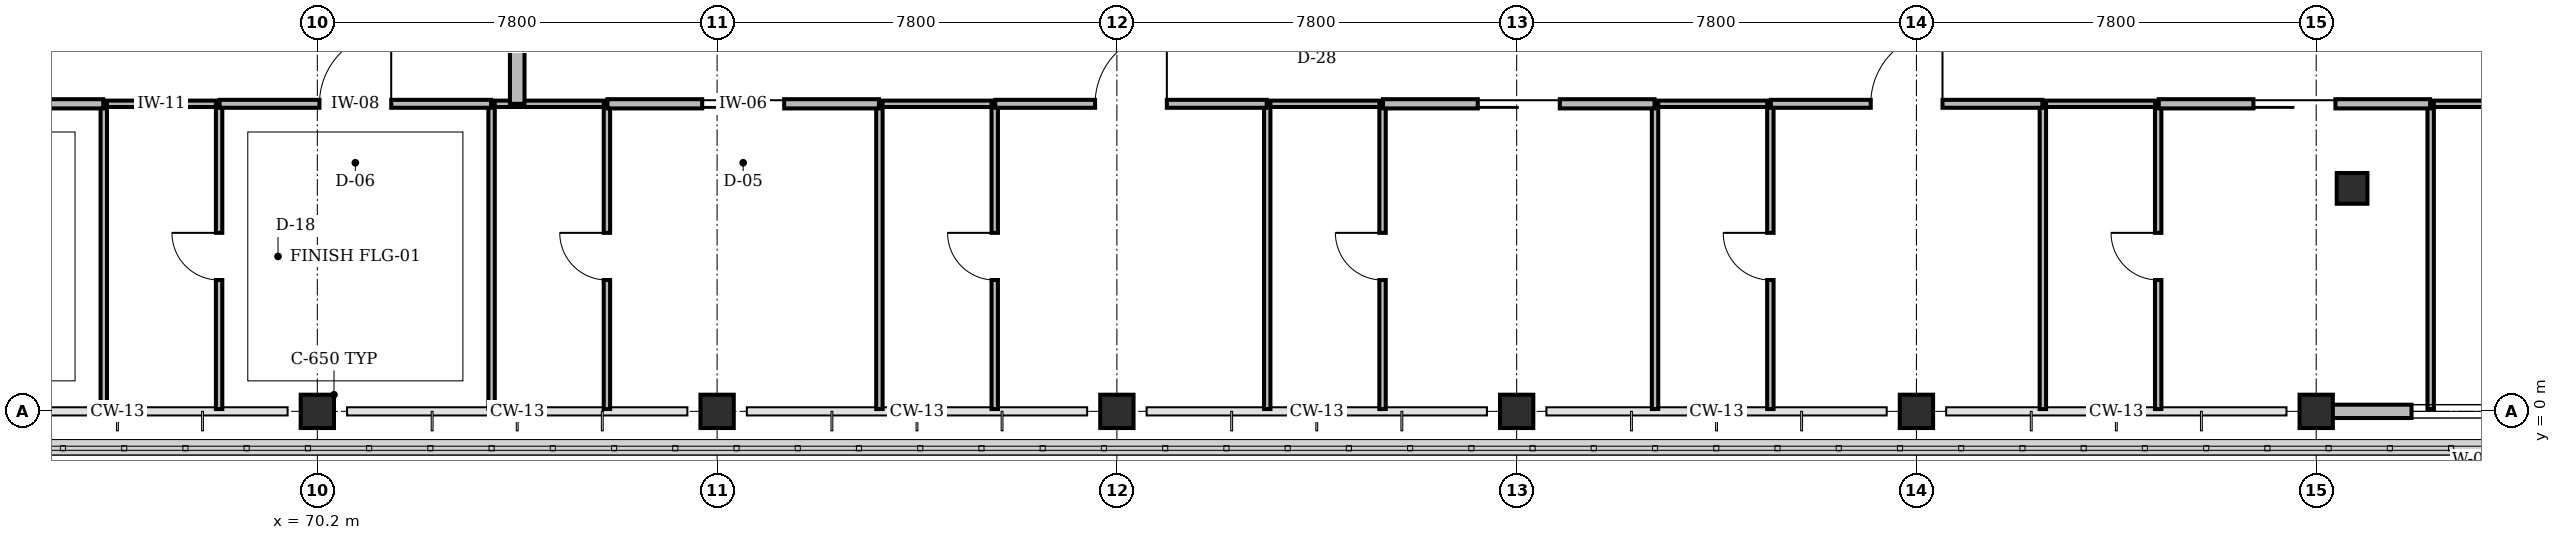
"""IFC4 building model, lengths in metres.
Left out: names, types, materials, properties, quantities, classifications, styles, units other than length and angle.
Written with IfcOpenShell. Run it as: python <this file> out.ifc"""

import sys

from ifc_helpers import new_model, si_unit, direction, frame, frame_2d, origin, origin_2d, place, context, subcontext, project, spatial, rectangle, circle, extrude, element, fill, save


model = new_model("IFC4")
c1 = context("Model", 3, precision=1e-05, world=origin(), true_north=direction((0.0, 1.0)))
c2 = subcontext(c1, "Body", "Model", "MODEL_VIEW")
j1 = project(units=[si_unit("LENGTHUNIT", "METRE"), si_unit("PLANEANGLEUNIT", "RADIAN")], contexts=[c1])
p1 = place(None, origin())
s1 = spatial("IfcSite", under=j1, at=p1, CompositionType="ELEMENT")
p2 = place(p1, origin())
s2 = spatial("IfcBuilding", under=s1, at=p2, CompositionType="ELEMENT")
p3 = place(p2, frame((0.0, 0.0, 18.0)))
s3 = spatial("IfcBuildingStorey", under=s2, at=p3, CompositionType="ELEMENT", Elevation=18.0)
for number, where, z_axis, x_axis in (
    (1, (70.2, 0.0, 0.0), (0.0, 0.0, 1.0), (1.0, 0.0, 0.0)),
    (2, (78.0, 0.0, 0.0), (0.0, 0.0, 1.0), (1.0, 0.0, 0.0)),
    (3, (85.8, 0.0, 0.0), (0.0, 0.0, 1.0), (1.0, 0.0, 0.0)),
    (4, (93.6, 0.0, 0.0), (0.0, 0.0, 1.0), (1.0, 0.0, 0.0)),
    (5, (101.4, 0.0, 0.0), (0.0, 0.0, 1.0), (1.0, 0.0, 0.0)),
    (6, (109.2, 0.0, 0.0), (0.0, 0.0, 1.0), (1.0, 0.0, 0.0)),
):
    element("IfcColumn", number, at=place(p3, frame(where, z_axis=z_axis, x_axis=x_axis)), inside=s3, PredefinedType="COLUMN", context=c2, shape_type="SweptSolid", body=[
        extrude(rectangle(XDim=0.65, YDim=0.65, at=origin_2d()), origin(), (0.0, 0.0, 1.0), 4.2),
    ])
p4 = place(p3, frame((109.9, 4.35, 0.0), z_axis=(0.0, 0.0, 1.0), x_axis=(1.0, 0.0, 0.0)))
e7 = element("IfcColumn", 7, at=p4, inside=s3, PredefinedType="PILASTER", context=c2, shape_type="SweptSolid", body=[
    extrude(circle(Radius=0.3, at=origin_2d()), origin(), (0.0, 0.0, 1.0), 4.2),
])
p5 = place(p3, frame((119.0, 0.0, 0.0), z_axis=(0.0, 0.0, 1.0), x_axis=(-1.0, 0.0, 0.0)))
e8 = element("IfcWall", 8, at=p5, inside=s3, PredefinedType="STANDARD", context=c2, shape_type="SweptSolid", body=[
    extrude(rectangle(XDim=9.51, YDim=0.26, at=frame_2d((4.755, 0.0))), origin(), (0.0, 0.0, 1.0), 2.805),
])
p6 = place(p5, frame((5.54, 0.0, 0.85)))
e9 = element("IfcOpeningElement", 9, at=p6, cuts=e8, PredefinedType="OPENING", context=c2, shape_type="SweptSolid", body=[
    extrude(rectangle(XDim=2.4, YDim=1.5, at=frame_2d((1.2, 0.75))), frame((0.0, 0.14, 0.0), z_axis=(0.0, -1.0, 0.0), x_axis=(1.0, 0.0, 0.0)), (0.0, 0.0, 1.0), 0.28),
])
p7 = place(p3, frame((66.033, 6.0, 0.0), z_axis=(0.0, 0.0, 1.0), x_axis=(1.0, 0.0, 0.0)))
e10 = element("IfcWall", 10, at=p7, inside=s3, PredefinedType="PARTITIONING", context=c2, shape_type="SweptSolid", body=[
    extrude(rectangle(XDim=2.25, YDim=0.125, at=frame_2d((1.125, 0.0))), origin(), (0.0, 0.0, 1.0), 3.9),
])
p8 = place(p3, frame((66.033, 0.045, 0.0), z_axis=(0.0, 0.0, 1.0), x_axis=(0.0, 1.0, 0.0)))
e11 = element("IfcWall", 11, at=p8, inside=s3, PredefinedType="PARTITIONING", context=c2, shape_type="SweptSolid", body=[
    extrude(rectangle(XDim=5.955, YDim=0.125, at=frame_2d((2.978, 0.0))), origin(), (0.0, 0.0, 1.0), 3.9),
])
p9 = place(p3, frame((68.283, 0.045, 0.0), z_axis=(0.0, 0.0, 1.0), x_axis=(0.0, 1.0, 0.0)))
e12 = element("IfcWall", 12, at=p9, inside=s3, PredefinedType="PARTITIONING", context=c2, shape_type="SweptSolid", body=[
    extrude(rectangle(XDim=5.955, YDim=0.125, at=frame_2d((2.978, 0.0))), origin(), (0.0, 0.0, 1.0), 3.9),
])
p10 = place(p9, frame((2.518, 0.0, 0.0)))
e13 = element("IfcOpeningElement", 13, at=p10, cuts=e12, PredefinedType="OPENING", context=c2, shape_type="SweptSolid", body=[
    extrude(rectangle(XDim=0.92, YDim=2.1, at=frame_2d((0.46, 1.05))), frame((0.0, 0.073, 0.0), z_axis=(0.0, -1.0, 0.0), x_axis=(1.0, 0.0, 0.0)), (0.0, 0.0, 1.0), 0.145),
])
p11 = place(p3, frame((73.6, 6.0, 0.0), z_axis=(0.0, 0.0, 1.0), x_axis=(1.0, 0.0, 0.0)))
e14 = element("IfcWall", 14, at=p11, inside=s3, PredefinedType="PARTITIONING", context=c2, shape_type="SweptSolid", body=[
    extrude(rectangle(XDim=2.25, YDim=0.125, at=frame_2d((1.125, 0.0))), origin(), (0.0, 0.0, 1.0), 3.9),
])
p12 = place(p3, frame((73.6, 0.045, 0.0), z_axis=(0.0, 0.0, 1.0), x_axis=(0.0, 1.0, 0.0)))
e15 = element("IfcWall", 15, at=p12, inside=s3, PredefinedType="PARTITIONING", context=c2, shape_type="SweptSolid", body=[
    extrude(rectangle(XDim=5.955, YDim=0.125, at=frame_2d((2.978, 0.0))), origin(), (0.0, 0.0, 1.0), 3.9),
])
p13 = place(p3, frame((75.85, 0.045, 0.0), z_axis=(0.0, 0.0, 1.0), x_axis=(0.0, 1.0, 0.0)))
e16 = element("IfcWall", 16, at=p13, inside=s3, PredefinedType="PARTITIONING", context=c2, shape_type="SweptSolid", body=[
    extrude(rectangle(XDim=5.955, YDim=0.125, at=frame_2d((2.978, 0.0))), origin(), (0.0, 0.0, 1.0), 3.9),
])
p14 = place(p13, frame((2.518, 0.0, 0.0)))
e17 = element("IfcOpeningElement", 17, at=p14, cuts=e16, PredefinedType="OPENING", context=c2, shape_type="SweptSolid", body=[
    extrude(rectangle(XDim=0.92, YDim=2.1, at=frame_2d((0.46, 1.05))), frame((0.0, 0.073, 0.0), z_axis=(0.0, -1.0, 0.0), x_axis=(1.0, 0.0, 0.0)), (0.0, 0.0, 1.0), 0.145),
])
p15 = place(p3, frame((81.167, 6.0, 0.0), z_axis=(0.0, 0.0, 1.0), x_axis=(1.0, 0.0, 0.0)))
e18 = element("IfcWall", 18, at=p15, inside=s3, PredefinedType="PARTITIONING", context=c2, shape_type="SweptSolid", body=[
    extrude(rectangle(XDim=2.25, YDim=0.125, at=frame_2d((1.125, 0.0))), origin(), (0.0, 0.0, 1.0), 3.9),
])
p16 = place(p3, frame((81.167, 0.045, 0.0), z_axis=(0.0, 0.0, 1.0), x_axis=(0.0, 1.0, 0.0)))
e19 = element("IfcWall", 19, at=p16, inside=s3, PredefinedType="PARTITIONING", context=c2, shape_type="SweptSolid", body=[
    extrude(rectangle(XDim=5.955, YDim=0.125, at=frame_2d((2.978, 0.0))), origin(), (0.0, 0.0, 1.0), 3.9),
])
p17 = place(p3, frame((83.417, 0.045, 0.0), z_axis=(0.0, 0.0, 1.0), x_axis=(0.0, 1.0, 0.0)))
e20 = element("IfcWall", 20, at=p17, inside=s3, PredefinedType="PARTITIONING", context=c2, shape_type="SweptSolid", body=[
    extrude(rectangle(XDim=5.955, YDim=0.125, at=frame_2d((2.978, 0.0))), origin(), (0.0, 0.0, 1.0), 3.9),
])
p18 = place(p17, frame((2.518, 0.0, 0.0)))
e21 = element("IfcOpeningElement", 21, at=p18, cuts=e20, PredefinedType="OPENING", context=c2, shape_type="SweptSolid", body=[
    extrude(rectangle(XDim=0.92, YDim=2.1, at=frame_2d((0.46, 1.05))), frame((0.0, 0.073, 0.0), z_axis=(0.0, -1.0, 0.0), x_axis=(1.0, 0.0, 0.0)), (0.0, 0.0, 1.0), 0.145),
])
p19 = place(p3, frame((88.733, 6.0, 0.0), z_axis=(0.0, 0.0, 1.0), x_axis=(1.0, 0.0, 0.0)))
e22 = element("IfcWall", 22, at=p19, inside=s3, PredefinedType="PARTITIONING", context=c2, shape_type="SweptSolid", body=[
    extrude(rectangle(XDim=2.25, YDim=0.125, at=frame_2d((1.125, 0.0))), origin(), (0.0, 0.0, 1.0), 3.9),
])
p20 = place(p3, frame((88.733, 0.045, 0.0), z_axis=(0.0, 0.0, 1.0), x_axis=(0.0, 1.0, 0.0)))
e23 = element("IfcWall", 23, at=p20, inside=s3, PredefinedType="PARTITIONING", context=c2, shape_type="SweptSolid", body=[
    extrude(rectangle(XDim=5.955, YDim=0.125, at=frame_2d((2.978, 0.0))), origin(), (0.0, 0.0, 1.0), 3.9),
])
p21 = place(p3, frame((90.983, 0.045, 0.0), z_axis=(0.0, 0.0, 1.0), x_axis=(0.0, 1.0, 0.0)))
e24 = element("IfcWall", 24, at=p21, inside=s3, PredefinedType="PARTITIONING", context=c2, shape_type="SweptSolid", body=[
    extrude(rectangle(XDim=5.955, YDim=0.125, at=frame_2d((2.978, 0.0))), origin(), (0.0, 0.0, 1.0), 3.9),
])
p22 = place(p21, frame((2.518, 0.0, 0.0)))
e25 = element("IfcOpeningElement", 25, at=p22, cuts=e24, PredefinedType="OPENING", context=c2, shape_type="SweptSolid", body=[
    extrude(rectangle(XDim=0.92, YDim=2.1, at=frame_2d((0.46, 1.05))), frame((0.0, 0.073, 0.0), z_axis=(0.0, -1.0, 0.0), x_axis=(1.0, 0.0, 0.0)), (0.0, 0.0, 1.0), 0.145),
])
p23 = place(p3, frame((96.3, 6.0, 0.0), z_axis=(0.0, 0.0, 1.0), x_axis=(1.0, 0.0, 0.0)))
e26 = element("IfcWall", 26, at=p23, inside=s3, PredefinedType="PARTITIONING", context=c2, shape_type="SweptSolid", body=[
    extrude(rectangle(XDim=2.25, YDim=0.125, at=frame_2d((1.125, 0.0))), origin(), (0.0, 0.0, 1.0), 3.9),
])
p24 = place(p3, frame((96.3, 0.045, 0.0), z_axis=(0.0, 0.0, 1.0), x_axis=(0.0, 1.0, 0.0)))
e27 = element("IfcWall", 27, at=p24, inside=s3, PredefinedType="PARTITIONING", context=c2, shape_type="SweptSolid", body=[
    extrude(rectangle(XDim=5.955, YDim=0.125, at=frame_2d((2.978, 0.0))), origin(), (0.0, 0.0, 1.0), 3.9),
])
p25 = place(p3, frame((98.55, 0.045, 0.0), z_axis=(0.0, 0.0, 1.0), x_axis=(0.0, 1.0, 0.0)))
e28 = element("IfcWall", 28, at=p25, inside=s3, PredefinedType="PARTITIONING", context=c2, shape_type="SweptSolid", body=[
    extrude(rectangle(XDim=5.955, YDim=0.125, at=frame_2d((2.978, 0.0))), origin(), (0.0, 0.0, 1.0), 3.9),
])
p26 = place(p25, frame((2.518, 0.0, 0.0)))
e29 = element("IfcOpeningElement", 29, at=p26, cuts=e28, PredefinedType="OPENING", context=c2, shape_type="SweptSolid", body=[
    extrude(rectangle(XDim=0.92, YDim=2.1, at=frame_2d((0.46, 1.05))), frame((0.0, 0.073, 0.0), z_axis=(0.0, -1.0, 0.0), x_axis=(1.0, 0.0, 0.0)), (0.0, 0.0, 1.0), 0.145),
])
p27 = place(p3, frame((103.867, 6.0, 0.0), z_axis=(0.0, 0.0, 1.0), x_axis=(1.0, 0.0, 0.0)))
e30 = element("IfcWall", 30, at=p27, inside=s3, PredefinedType="PARTITIONING", context=c2, shape_type="SweptSolid", body=[
    extrude(rectangle(XDim=2.25, YDim=0.125, at=frame_2d((1.125, 0.0))), origin(), (0.0, 0.0, 1.0), 3.9),
])
p28 = place(p3, frame((103.867, 0.045, 0.0), z_axis=(0.0, 0.0, 1.0), x_axis=(0.0, 1.0, 0.0)))
e31 = element("IfcWall", 31, at=p28, inside=s3, PredefinedType="PARTITIONING", context=c2, shape_type="SweptSolid", body=[
    extrude(rectangle(XDim=5.955, YDim=0.125, at=frame_2d((2.978, 0.0))), origin(), (0.0, 0.0, 1.0), 3.9),
])
p29 = place(p3, frame((106.117, 0.045, 0.0), z_axis=(0.0, 0.0, 1.0), x_axis=(0.0, 1.0, 0.0)))
e32 = element("IfcWall", 32, at=p29, inside=s3, PredefinedType="PARTITIONING", context=c2, shape_type="SweptSolid", body=[
    extrude(rectangle(XDim=5.955, YDim=0.125, at=frame_2d((2.978, 0.0))), origin(), (0.0, 0.0, 1.0), 3.9),
])
p30 = place(p29, frame((2.518, 0.0, 0.0)))
e33 = element("IfcOpeningElement", 33, at=p30, cuts=e32, PredefinedType="OPENING", context=c2, shape_type="SweptSolid", body=[
    extrude(rectangle(XDim=0.92, YDim=2.1, at=frame_2d((0.46, 1.05))), frame((0.0, 0.073, 0.0), z_axis=(0.0, -1.0, 0.0), x_axis=(1.0, 0.0, 0.0)), (0.0, 0.0, 1.0), 0.145),
])
p31 = place(p3, frame((111.433, 6.0, 0.0), z_axis=(0.0, 0.0, 1.0), x_axis=(1.0, 0.0, 0.0)))
e34 = element("IfcWall", 34, at=p31, inside=s3, PredefinedType="PARTITIONING", context=c2, shape_type="SweptSolid", body=[
    extrude(rectangle(XDim=2.25, YDim=0.125, at=frame_2d((1.125, 0.0))), origin(), (0.0, 0.0, 1.0), 3.9),
])
p32 = place(p3, frame((111.433, 0.045, 0.0), z_axis=(0.0, 0.0, 1.0), x_axis=(0.0, 1.0, 0.0)))
e35 = element("IfcWall", 35, at=p32, inside=s3, PredefinedType="PARTITIONING", context=c2, shape_type="SweptSolid", body=[
    extrude(rectangle(XDim=5.955, YDim=0.125, at=frame_2d((2.978, 0.0))), origin(), (0.0, 0.0, 1.0), 3.9),
])
p33 = place(p3, frame((60.727, 6.0, 0.0), z_axis=(0.0, 0.0, 1.0), x_axis=(1.0, 0.0, 0.0)))
e36 = element("IfcWall", 36, at=p33, inside=s3, PredefinedType="PARTITIONING", context=c2, shape_type="SweptSolid", body=[
    extrude(rectangle(XDim=5.296, YDim=0.18, at=frame_2d((2.648, 0.0))), origin(), (0.0, 0.0, 1.0), 3.9),
])
p34 = place(p33, frame((1.848, 0.0, 0.0)))
e37 = element("IfcOpeningElement", 37, at=p34, cuts=e36, PredefinedType="OPENING", context=c2, shape_type="SweptSolid", body=[
    extrude(rectangle(XDim=1.6, YDim=2.25, at=frame_2d((0.8, 1.125))), frame((0.0, 0.1, 0.0), z_axis=(0.0, -1.0, 0.0), x_axis=(1.0, 0.0, 0.0)), (0.0, 0.0, 1.0), 0.2),
])
p35 = place(p3, frame((68.293, 6.0, 0.0), z_axis=(0.0, 0.0, 1.0), x_axis=(1.0, 0.0, 0.0)))
e38 = element("IfcWall", 38, at=p35, inside=s3, PredefinedType="PARTITIONING", context=c2, shape_type="SweptSolid", body=[
    extrude(rectangle(XDim=5.297, YDim=0.155, at=frame_2d((2.648, 0.0))), origin(), (0.0, 0.0, 1.0), 3.9),
])
p36 = place(p35, frame((1.948, 0.0, 0.0)))
e39 = element("IfcOpeningElement", 39, at=p36, cuts=e38, PredefinedType="OPENING", context=c2, shape_type="SweptSolid", body=[
    extrude(rectangle(XDim=1.4, YDim=2.2, at=frame_2d((0.7, 1.1))), frame((0.0, 0.087, 0.0), z_axis=(0.0, -1.0, 0.0), x_axis=(1.0, 0.0, 0.0)), (0.0, 0.0, 1.0), 0.175),
])
p37 = place(p3, frame((75.86, 6.0, 0.0), z_axis=(0.0, 0.0, 1.0), x_axis=(1.0, 0.0, 0.0)))
e40 = element("IfcWall", 40, at=p37, inside=s3, PredefinedType="PARTITIONING", context=c2, shape_type="SweptSolid", body=[
    extrude(rectangle(XDim=5.297, YDim=0.18, at=frame_2d((2.648, 0.0))), origin(), (0.0, 0.0, 1.0), 3.9),
])
p38 = place(p37, frame((1.848, 0.0, 0.0)))
e41 = element("IfcOpeningElement", 41, at=p38, cuts=e40, PredefinedType="OPENING", context=c2, shape_type="SweptSolid", body=[
    extrude(rectangle(XDim=1.6, YDim=2.25, at=frame_2d((0.8, 1.125))), frame((0.0, 0.1, 0.0), z_axis=(0.0, -1.0, 0.0), x_axis=(1.0, 0.0, 0.0)), (0.0, 0.0, 1.0), 0.2),
])
p39 = place(p3, frame((83.427, 6.0, 0.0), z_axis=(0.0, 0.0, 1.0), x_axis=(1.0, 0.0, 0.0)))
e42 = element("IfcWall", 42, at=p39, inside=s3, PredefinedType="PARTITIONING", context=c2, shape_type="SweptSolid", body=[
    extrude(rectangle(XDim=5.296, YDim=0.155, at=frame_2d((2.648, 0.0))), origin(), (0.0, 0.0, 1.0), 3.9),
])
p40 = place(p39, frame((1.948, 0.0, 0.0)))
e43 = element("IfcOpeningElement", 43, at=p40, cuts=e42, PredefinedType="OPENING", context=c2, shape_type="SweptSolid", body=[
    extrude(rectangle(XDim=1.4, YDim=2.2, at=frame_2d((0.7, 1.1))), frame((0.0, 0.087, 0.0), z_axis=(0.0, -1.0, 0.0), x_axis=(1.0, 0.0, 0.0)), (0.0, 0.0, 1.0), 0.175),
])
p41 = place(p3, frame((90.993, 6.0, 0.0), z_axis=(0.0, 0.0, 1.0), x_axis=(1.0, 0.0, 0.0)))
e44 = element("IfcWall", 44, at=p41, inside=s3, PredefinedType="PARTITIONING", context=c2, shape_type="SweptSolid", body=[
    extrude(rectangle(XDim=5.297, YDim=0.18, at=frame_2d((2.648, 0.0))), origin(), (0.0, 0.0, 1.0), 3.9),
])
p42 = place(p41, frame((1.848, 0.0, 0.0)))
e45 = element("IfcOpeningElement", 45, at=p42, cuts=e44, PredefinedType="OPENING", context=c2, shape_type="SweptSolid", body=[
    extrude(rectangle(XDim=1.6, YDim=2.25, at=frame_2d((0.8, 1.125))), frame((0.0, 0.1, 0.0), z_axis=(0.0, -1.0, 0.0), x_axis=(1.0, 0.0, 0.0)), (0.0, 0.0, 1.0), 0.2),
])
p43 = place(p3, frame((98.56, 6.0, 0.0), z_axis=(0.0, 0.0, 1.0), x_axis=(1.0, 0.0, 0.0)))
e46 = element("IfcWall", 46, at=p43, inside=s3, PredefinedType="PARTITIONING", context=c2, shape_type="SweptSolid", body=[
    extrude(rectangle(XDim=5.297, YDim=0.155, at=frame_2d((2.648, 0.0))), origin(), (0.0, 0.0, 1.0), 3.9),
])
p44 = place(p43, frame((1.948, 0.0, 0.0)))
e47 = element("IfcOpeningElement", 47, at=p44, cuts=e46, PredefinedType="OPENING", context=c2, shape_type="SweptSolid", body=[
    extrude(rectangle(XDim=1.4, YDim=2.2, at=frame_2d((0.7, 1.1))), frame((0.0, 0.087, 0.0), z_axis=(0.0, -1.0, 0.0), x_axis=(1.0, 0.0, 0.0)), (0.0, 0.0, 1.0), 0.175),
])
p45 = place(p3, frame((106.127, 6.0, 0.0), z_axis=(0.0, 0.0, 1.0), x_axis=(1.0, 0.0, 0.0)))
e48 = element("IfcWall", 48, at=p45, inside=s3, PredefinedType="PARTITIONING", context=c2, shape_type="SweptSolid", body=[
    extrude(rectangle(XDim=5.296, YDim=0.18, at=frame_2d((2.648, 0.0))), origin(), (0.0, 0.0, 1.0), 3.9),
])
p46 = place(p45, frame((1.848, 0.0, 0.0)))
e49 = element("IfcOpeningElement", 49, at=p46, cuts=e48, PredefinedType="OPENING", context=c2, shape_type="SweptSolid", body=[
    extrude(rectangle(XDim=1.6, YDim=2.25, at=frame_2d((0.8, 1.125))), frame((0.0, 0.1, 0.0), z_axis=(0.0, -1.0, 0.0), x_axis=(1.0, 0.0, 0.0)), (0.0, 0.0, 1.0), 0.2),
])
p47 = place(p3, frame((74.1, 6.0, 0.0), z_axis=(0.0, 0.0, 1.0), x_axis=(0.0, 1.0, 0.0)))
e50 = element("IfcWall", 50, at=p47, inside=s3, PredefinedType="STANDARD", context=c2, shape_type="SweptSolid", body=[
    extrude(rectangle(XDim=2.4, YDim=0.285, at=frame_2d((1.2, 0.0))), origin(), (0.0, 0.0, 1.0), 3.9),
])
p48 = place(p6, origin())
e51 = element("IfcWindow", 51, at=p48, inside=s3, PartitioningType="SINGLE_PANEL", PredefinedType="WINDOW", context=c2, shape_type="SweptSolid", body=[
    extrude(rectangle(XDim=2.4, YDim=1.5, at=frame_2d((1.2, 0.75))), frame((0.0, 0.03, 0.0), z_axis=(0.0, -1.0, 0.0), x_axis=(1.0, 0.0, 0.0)), (0.0, 0.0, 1.0), 0.06),
])
fill(e9, e51)
p49 = place(p10, origin())
e52 = element("IfcDoor", 52, at=p49, inside=s3, OperationType="SINGLE_SWING_RIGHT", PredefinedType="DOOR", context=c2, shape_type="SweptSolid", body=[
    extrude(rectangle(XDim=0.92, YDim=2.1, at=frame_2d((0.46, 1.05))), frame((0.0, 0.025, 0.0), z_axis=(0.0, -1.0, 0.0), x_axis=(1.0, 0.0, 0.0)), (0.0, 0.0, 1.0), 0.05),
])
fill(e13, e52)
p50 = place(p14, origin())
e53 = element("IfcDoor", 53, at=p50, inside=s3, OperationType="SINGLE_SWING_RIGHT", PredefinedType="DOOR", context=c2, shape_type="SweptSolid", body=[
    extrude(rectangle(XDim=0.92, YDim=2.1, at=frame_2d((0.46, 1.05))), frame((0.0, 0.025, 0.0), z_axis=(0.0, -1.0, 0.0), x_axis=(1.0, 0.0, 0.0)), (0.0, 0.0, 1.0), 0.05),
])
fill(e17, e53)
p51 = place(p18, origin())
e54 = element("IfcDoor", 54, at=p51, inside=s3, OperationType="SINGLE_SWING_RIGHT", PredefinedType="DOOR", context=c2, shape_type="SweptSolid", body=[
    extrude(rectangle(XDim=0.92, YDim=2.1, at=frame_2d((0.46, 1.05))), frame((0.0, 0.025, 0.0), z_axis=(0.0, -1.0, 0.0), x_axis=(1.0, 0.0, 0.0)), (0.0, 0.0, 1.0), 0.05),
])
fill(e21, e54)
p52 = place(p22, origin())
e55 = element("IfcDoor", 55, at=p52, inside=s3, OperationType="SINGLE_SWING_RIGHT", PredefinedType="DOOR", context=c2, shape_type="SweptSolid", body=[
    extrude(rectangle(XDim=0.92, YDim=2.1, at=frame_2d((0.46, 1.05))), frame((0.0, 0.025, 0.0), z_axis=(0.0, -1.0, 0.0), x_axis=(1.0, 0.0, 0.0)), (0.0, 0.0, 1.0), 0.05),
])
fill(e25, e55)
p53 = place(p26, origin())
e56 = element("IfcDoor", 56, at=p53, inside=s3, OperationType="SINGLE_SWING_RIGHT", PredefinedType="DOOR", context=c2, shape_type="SweptSolid", body=[
    extrude(rectangle(XDim=0.92, YDim=2.1, at=frame_2d((0.46, 1.05))), frame((0.0, 0.025, 0.0), z_axis=(0.0, -1.0, 0.0), x_axis=(1.0, 0.0, 0.0)), (0.0, 0.0, 1.0), 0.05),
])
fill(e29, e56)
p54 = place(p30, origin())
e57 = element("IfcDoor", 57, at=p54, inside=s3, OperationType="SINGLE_SWING_RIGHT", PredefinedType="DOOR", context=c2, shape_type="SweptSolid", body=[
    extrude(rectangle(XDim=0.92, YDim=2.1, at=frame_2d((0.46, 1.05))), frame((0.0, 0.025, 0.0), z_axis=(0.0, -1.0, 0.0), x_axis=(1.0, 0.0, 0.0)), (0.0, 0.0, 1.0), 0.05),
])
fill(e33, e57)
p55 = place(p36, origin())
e58 = element("IfcDoor", 58, at=p55, inside=s3, OperationType="SINGLE_SWING_RIGHT", PredefinedType="DOOR", context=c2, shape_type="SweptSolid", body=[
    extrude(rectangle(XDim=1.4, YDim=2.2, at=frame_2d((0.7, 1.1))), frame((0.0, 0.025, 0.0), z_axis=(0.0, -1.0, 0.0), x_axis=(1.0, 0.0, 0.0)), (0.0, 0.0, 1.0), 0.05),
])
fill(e39, e58)
p56 = place(p38, origin())
e59 = element("IfcDoor", 59, at=p56, inside=s3, OperationType="SLIDING_TO_RIGHT", PredefinedType="DOOR", context=c2, shape_type="SweptSolid", body=[
    extrude(rectangle(XDim=1.6, YDim=2.25, at=frame_2d((0.8, 1.125))), frame((0.0, 0.025, 0.0), z_axis=(0.0, -1.0, 0.0), x_axis=(1.0, 0.0, 0.0)), (0.0, 0.0, 1.0), 0.05),
])
fill(e41, e59)
p57 = place(p40, origin())
e60 = element("IfcDoor", 60, at=p57, inside=s3, OperationType="SINGLE_SWING_RIGHT", PredefinedType="DOOR", context=c2, shape_type="SweptSolid", body=[
    extrude(rectangle(XDim=1.4, YDim=2.2, at=frame_2d((0.7, 1.1))), frame((0.0, 0.025, 0.0), z_axis=(0.0, -1.0, 0.0), x_axis=(1.0, 0.0, 0.0)), (0.0, 0.0, 1.0), 0.05),
])
fill(e43, e60)
p58 = place(p42, origin())
e61 = element("IfcDoor", 61, at=p58, inside=s3, OperationType="SLIDING_TO_RIGHT", PredefinedType="DOOR", context=c2, shape_type="SweptSolid", body=[
    extrude(rectangle(XDim=1.6, YDim=2.25, at=frame_2d((0.8, 1.125))), frame((0.0, 0.025, 0.0), z_axis=(0.0, -1.0, 0.0), x_axis=(1.0, 0.0, 0.0)), (0.0, 0.0, 1.0), 0.05),
])
fill(e45, e61)
p59 = place(p44, origin())
e62 = element("IfcDoor", 62, at=p59, inside=s3, OperationType="SINGLE_SWING_RIGHT", PredefinedType="DOOR", context=c2, shape_type="SweptSolid", body=[
    extrude(rectangle(XDim=1.4, YDim=2.2, at=frame_2d((0.7, 1.1))), frame((0.0, 0.025, 0.0), z_axis=(0.0, -1.0, 0.0), x_axis=(1.0, 0.0, 0.0)), (0.0, 0.0, 1.0), 0.05),
])
fill(e47, e62)
p60 = place(p46, origin())
e63 = element("IfcDoor", 63, at=p60, inside=s3, OperationType="SLIDING_TO_RIGHT", PredefinedType="DOOR", context=c2, shape_type="SweptSolid", body=[
    extrude(rectangle(XDim=1.6, YDim=2.25, at=frame_2d((0.8, 1.125))), frame((0.0, 0.025, 0.0), z_axis=(0.0, -1.0, 0.0), x_axis=(1.0, 0.0, 0.0)), (0.0, 0.0, 1.0), 0.05),
])
fill(e49, e63)
save(model, sys.argv[1])
